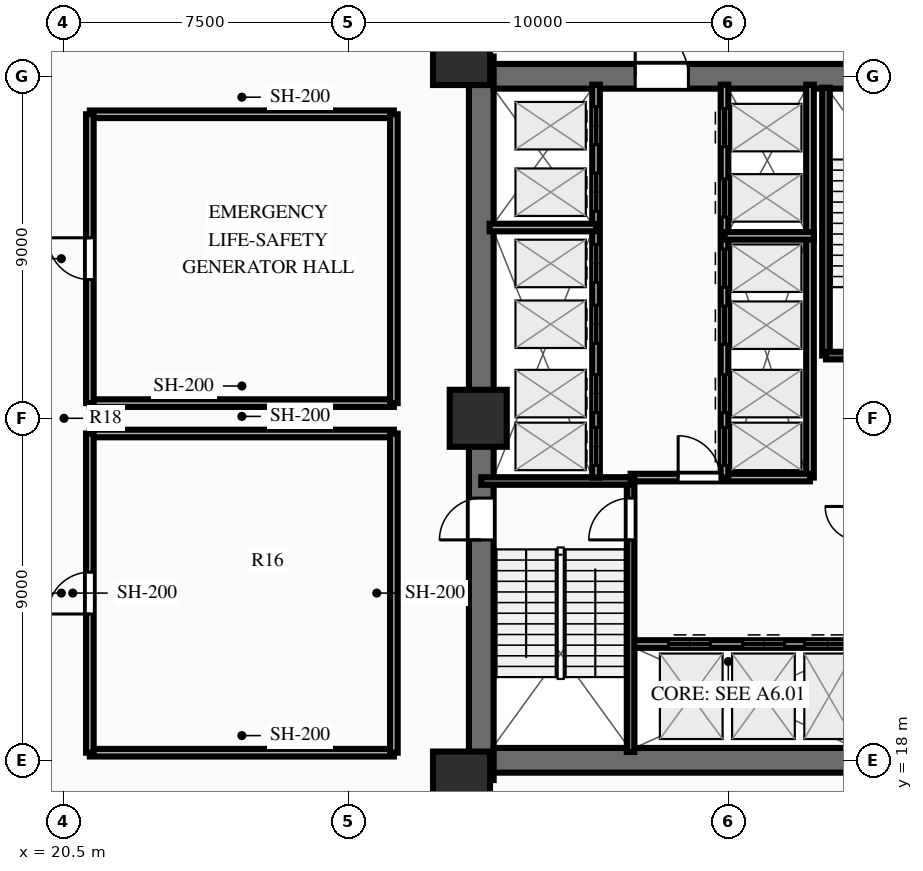
"""IFC4 building model, lengths in metres.
Left out: names, types, materials, properties, quantities, classifications, styles, units other than length and angle.
Written with IfcOpenShell. Run it as: python <this file> out.ifc"""

import sys

from ifc_helpers import new_model, si_unit, direction, frame, frame_2d, origin, origin_2d, place, context, subcontext, project, spatial, rectangle, extrude, source, transform, mapped, element, fill, save


model = new_model("IFC4")
c1 = context("Model", 3, precision=1e-05, world=origin(), true_north=direction((0.0, 1.0)))
c2 = subcontext(c1, "Body", "Model", "MODEL_VIEW")
j1 = project(units=[si_unit("LENGTHUNIT", "METRE"), si_unit("PLANEANGLEUNIT", "RADIAN")], contexts=[c1])
p1 = place(None, origin())
s1 = spatial("IfcSite", under=j1, at=p1, CompositionType="ELEMENT")
p2 = place(p1, origin())
s2 = spatial("IfcBuilding", under=s1, at=p2, CompositionType="ELEMENT")
p3 = place(p2, frame((0.0, 0.0, -4.6)))
s3 = spatial("IfcBuildingStorey", under=s2, at=p3, CompositionType="ELEMENT", Elevation=-4.6)
p4 = place(p3, frame((31.5, 17.48, 0.0), z_axis=(0.0, 0.0, 1.0), x_axis=(0.0, 1.0, 0.0)))
e1 = element("IfcWall", 1, at=p4, inside=s3, PredefinedType="SHEAR", context=c2, shape_type="SweptSolid", body=[
    extrude(rectangle(XDim=19.04, YDim=0.65, at=frame_2d((9.52, 0.0))), origin(), (0.0, 0.0, 1.0), 4.6),
])
p5 = place(p4, frame((6.32, 0.0, 0.0)))
e2 = element("IfcOpeningElement", 2, at=p5, cuts=e1, PredefinedType="OPENING", context=c2, shape_type="SweptSolid", body=[
    extrude(rectangle(XDim=1.1, YDim=2.15, at=frame_2d((0.55, 1.075))), frame((0.0, 0.337, 0.0), z_axis=(0.0, -1.0, 0.0), x_axis=(1.0, 0.0, 0.0)), (0.0, 0.0, 1.0), 0.674),
])
p6 = place(p3, frame((31.825, 18.0, 0.0), z_axis=(0.0, 0.0, 1.0), x_axis=(1.0, 0.0, 0.0)))
e3 = element("IfcWall", 3, at=p6, inside=s3, PredefinedType="SHEAR", context=c2, shape_type="SweptSolid", body=[
    extrude(rectangle(XDim=12.35, YDim=0.65, at=frame_2d((6.175, 0.0))), origin(), (0.0, 0.0, 1.0), 4.6),
])
p7 = place(p3, frame((31.825, 36.0, 0.0), z_axis=(0.0, 0.0, 1.0), x_axis=(1.0, 0.0, 0.0)))
e4 = element("IfcWall", 4, at=p7, inside=s3, PredefinedType="SHEAR", context=c2, shape_type="SweptSolid", body=[
    extrude(rectangle(XDim=12.35, YDim=0.65, at=frame_2d((6.175, 0.0))), origin(), (0.0, 0.0, 1.0), 4.6),
])
p8 = place(p7, frame((5.125, 0.0, 0.0), z_axis=(0.0, 0.0, 1.0), x_axis=(-1.0, 0.0, 0.0)))
e5 = element("IfcOpeningElement", 5, at=p8, cuts=e4, PredefinedType="OPENING", context=c2, shape_type="SweptSolid", body=[
    extrude(rectangle(XDim=1.4, YDim=2.15, at=frame_2d((0.7, 1.075))), frame((0.0, 0.337, 0.0), z_axis=(0.0, -1.0, 0.0), x_axis=(1.0, 0.0, 0.0)), (0.0, 0.0, 1.0), 0.674),
])
m1 = source(origin(), c2, "Body", "SweptSolid", [
    extrude(rectangle(XDim=1.5, YDim=1.5, at=origin_2d()), origin(), (0.0, 0.0, 1.0), 4.6),
])
for number, where, z_axis, x_axis in (
    (6, (30.98, 17.48, 0.0), (0.0, 0.0, 1.0), (1.0, 0.0, 0.0)),
    (7, (30.98, 36.52, 0.0), (0.0, 0.0, 1.0), (1.0, 0.0, 0.0)),
    (8, (31.42, 27.0, 0.0), (0.0, 0.0, 1.0), (1.0, 0.0, 0.0)),
):
    element("IfcColumn", number, at=place(p3, frame(where, z_axis=z_axis, x_axis=x_axis)), inside=s3, PredefinedType="COLUMN", context=c2, shape_type="MappedRepresentation", body=[
        mapped(m1, transform((0.0, 0.0, 0.0), scale=1.0)),
    ])
p9 = place(p3, frame((40.15, 25.44, 0.0), z_axis=(0.0, 0.0, 1.0), x_axis=(0.0, 1.0, 0.0)))
e9 = element("IfcWall", 9, at=p9, inside=s3, PredefinedType="PARTITIONING", context=c2, shape_type="SweptSolid", body=[
    extrude(rectangle(XDim=6.36, YDim=0.2, at=frame_2d((3.18, 0.0))), origin(), (0.0, 0.0, 1.0), 4.32),
])
p10 = place(p3, frame((40.15, 31.8, 0.0), z_axis=(0.0, 0.0, 1.0), x_axis=(0.0, 1.0, 0.0)))
e10 = element("IfcWall", 10, at=p10, inside=s3, PredefinedType="PARTITIONING", context=c2, shape_type="SweptSolid", body=[
    extrude(rectangle(XDim=3.98, YDim=0.2, at=frame_2d((1.99, 0.0))), origin(), (0.0, 0.0, 1.0), 4.32),
])
p11 = place(p3, frame((35.43, 21.06, 0.0), z_axis=(0.0, 0.0, 1.0), x_axis=(1.0, 0.0, 0.0)))
e11 = element("IfcWall", 11, at=p11, inside=s3, PredefinedType="PARTITIONING", context=c2, shape_type="SweptSolid", body=[
    extrude(rectangle(XDim=6.02, YDim=0.2, at=frame_2d((3.01, 0.0))), origin(), (0.0, 0.0, 1.0), 4.32),
])
p12 = place(p11, frame((1.0, 0.0, 0.0)))
e12 = element("IfcOpeningElement", 12, at=p12, cuts=e11, PredefinedType="OPENING", context=c2, shape_type="SweptSolid", body=[
    extrude(rectangle(XDim=1.1, YDim=2.15, at=frame_2d((0.55, 1.075))), frame((0.0, 0.112, 0.0), z_axis=(0.0, -1.0, 0.0), x_axis=(1.0, 0.0, 0.0)), (0.0, 0.0, 1.0), 0.224),
])
p13 = place(p11, frame((2.95, 0.0, 0.0)))
e13 = element("IfcOpeningElement", 13, at=p13, cuts=e11, PredefinedType="OPENING", context=c2, shape_type="SweptSolid", body=[
    extrude(rectangle(XDim=1.1, YDim=2.15, at=frame_2d((0.55, 1.075))), frame((0.0, 0.112, 0.0), z_axis=(0.0, -1.0, 0.0), x_axis=(1.0, 0.0, 0.0)), (0.0, 0.0, 1.0), 0.224),
])
p14 = place(p11, frame((4.58, 0.0, 0.0)))
e14 = element("IfcOpeningElement", 14, at=p14, cuts=e11, PredefinedType="OPENING", context=c2, shape_type="SweptSolid", body=[
    extrude(rectangle(XDim=1.2, YDim=2.15, at=frame_2d((0.6, 1.075))), frame((0.0, 0.112, 0.0), z_axis=(0.0, -1.0, 0.0), x_axis=(1.0, 0.0, 0.0)), (0.0, 0.0, 1.0), 0.224),
])
p15 = place(p3, frame((35.43, 25.44, 0.0), z_axis=(0.0, 0.0, 1.0), x_axis=(1.0, 0.0, 0.0)))
e15 = element("IfcWall", 15, at=p15, inside=s3, PredefinedType="PARTITIONING", context=c2, shape_type="SweptSolid", body=[
    extrude(rectangle(XDim=4.72, YDim=0.2, at=frame_2d((2.36, 0.0))), origin(), (0.0, 0.0, 1.0), 4.32),
])
p16 = place(p15, frame((1.25, 0.0, 0.0)))
e16 = element("IfcOpeningElement", 16, at=p16, cuts=e15, PredefinedType="OPENING", context=c2, shape_type="SweptSolid", body=[
    extrude(rectangle(XDim=1.1, YDim=2.15, at=frame_2d((0.55, 1.075))), frame((0.0, 0.112, 0.0), z_axis=(0.0, -1.0, 0.0), x_axis=(1.0, 0.0, 0.0)), (0.0, 0.0, 1.0), 0.224),
])
p17 = place(p3, frame((35.43, 18.22, 0.0), z_axis=(0.0, 0.0, 1.0), x_axis=(0.0, 1.0, 0.0)))
e17 = element("IfcWall", 17, at=p17, inside=s3, PredefinedType="SOLIDWALL", context=c2, shape_type="SweptSolid", body=[
    extrude(rectangle(XDim=7.22, YDim=0.2, at=frame_2d((3.61, 0.0))), origin(), (0.0, 0.0, 1.0), 4.32),
])
p18 = place(p17, frame((6.68, 0.0, 0.0), z_axis=(0.0, 0.0, 1.0), x_axis=(-1.0, 0.0, 0.0)))
e18 = element("IfcOpeningElement", 18, at=p18, cuts=e17, PredefinedType="OPENING", context=c2, shape_type="SweptSolid", body=[
    extrude(rectangle(XDim=1.1, YDim=2.15, at=frame_2d((0.55, 1.075))), frame((0.0, 0.112, 0.0), z_axis=(0.0, -1.0, 0.0), x_axis=(1.0, 0.0, 0.0)), (0.0, 0.0, 1.0), 0.224),
])
p19 = place(p3, frame((31.5, 25.35, 0.0), z_axis=(0.0, 0.0, 1.0), x_axis=(1.0, 0.0, 0.0)))
e19 = element("IfcWall", 19, at=p19, inside=s3, PredefinedType="SOLIDWALL", context=c2, shape_type="SweptSolid", body=[
    extrude(rectangle(XDim=3.93, YDim=0.2, at=frame_2d((1.965, 0.0))), origin(), (0.0, 0.0, 1.0), 4.32),
])
p20 = place(p3, frame((40.57, 28.65, 0.0), z_axis=(0.0, 0.0, 1.0), x_axis=(0.0, 1.0, 0.0)))
e20 = element("IfcWall", 20, at=p20, inside=s3, PredefinedType="SOLIDWALL", context=c2, shape_type="SweptSolid", body=[
    extrude(rectangle(XDim=7.05, YDim=0.2, at=frame_2d((3.525, 0.0))), origin(), (0.0, 0.0, 1.0), 4.32),
])
p21 = place(p3, frame((40.57, 28.65, 0.0), z_axis=(0.0, 0.0, 1.0), x_axis=(1.0, 0.0, 0.0)))
e21 = element("IfcWall", 21, at=p21, inside=s3, PredefinedType="SOLIDWALL", context=c2, shape_type="SweptSolid", body=[
    extrude(rectangle(XDim=3.93, YDim=0.2, at=frame_2d((1.965, 0.0))), origin(), (0.0, 0.0, 1.0), 4.32),
])
p22 = place(p3, frame((34.52, 25.44, 0.0), z_axis=(0.0, 0.0, 1.0), x_axis=(0.0, 1.0, 0.0)))
e22 = element("IfcWall", 22, at=p22, inside=s3, PredefinedType="PARTITIONING", context=c2, shape_type="SweptSolid", body=[
    extrude(rectangle(XDim=10.34, YDim=0.2, at=frame_2d((5.17, 0.0))), origin(), (0.0, 0.0, 1.0), 4.32),
])
p23 = place(p22, frame((0.32, 0.0, 0.0)))
e23 = element("IfcOpeningElement", 23, at=p23, cuts=e22, PredefinedType="OPENING", context=c2, shape_type="SweptSolid", body=[
    extrude(rectangle(XDim=1.0, YDim=2.15, at=frame_2d((0.5, 1.075))), frame((0.0, 0.112, 0.0), z_axis=(0.0, -1.0, 0.0), x_axis=(1.0, 0.0, 0.0)), (0.0, 0.0, 1.0), 0.224),
])
p24 = place(p22, frame((1.71, 0.0, 0.0)))
e24 = element("IfcOpeningElement", 24, at=p24, cuts=e22, PredefinedType="OPENING", context=c2, shape_type="SweptSolid", body=[
    extrude(rectangle(XDim=1.0, YDim=2.15, at=frame_2d((0.5, 1.075))), frame((0.0, 0.112, 0.0), z_axis=(0.0, -1.0, 0.0), x_axis=(1.0, 0.0, 0.0)), (0.0, 0.0, 1.0), 0.224),
])
p25 = place(p22, frame((3.535, 0.0, 0.0)))
e25 = element("IfcOpeningElement", 25, at=p25, cuts=e22, PredefinedType="OPENING", context=c2, shape_type="SweptSolid", body=[
    extrude(rectangle(XDim=1.0, YDim=2.15, at=frame_2d((0.5, 1.075))), frame((0.0, 0.112, 0.0), z_axis=(0.0, -1.0, 0.0), x_axis=(1.0, 0.0, 0.0)), (0.0, 0.0, 1.0), 0.224),
])
p26 = place(p22, frame((5.135, 0.0, 0.0)))
e26 = element("IfcOpeningElement", 26, at=p26, cuts=e22, PredefinedType="OPENING", context=c2, shape_type="SweptSolid", body=[
    extrude(rectangle(XDim=1.0, YDim=2.15, at=frame_2d((0.5, 1.075))), frame((0.0, 0.112, 0.0), z_axis=(0.0, -1.0, 0.0), x_axis=(1.0, 0.0, 0.0)), (0.0, 0.0, 1.0), 0.224),
])
p27 = place(p22, frame((7.01, 0.0, 0.0)))
e27 = element("IfcOpeningElement", 27, at=p27, cuts=e22, PredefinedType="OPENING", context=c2, shape_type="SweptSolid", body=[
    extrude(rectangle(XDim=1.0, YDim=2.15, at=frame_2d((0.5, 1.075))), frame((0.0, 0.112, 0.0), z_axis=(0.0, -1.0, 0.0), x_axis=(1.0, 0.0, 0.0)), (0.0, 0.0, 1.0), 0.224),
])
p28 = place(p22, frame((8.76, 0.0, 0.0)))
e28 = element("IfcOpeningElement", 28, at=p28, cuts=e22, PredefinedType="OPENING", context=c2, shape_type="SweptSolid", body=[
    extrude(rectangle(XDim=1.0, YDim=2.15, at=frame_2d((0.5, 1.075))), frame((0.0, 0.112, 0.0), z_axis=(0.0, -1.0, 0.0), x_axis=(1.0, 0.0, 0.0)), (0.0, 0.0, 1.0), 0.224),
])
p29 = place(p3, frame((31.72, 32.02, 0.0), z_axis=(0.0, 0.0, 1.0), x_axis=(1.0, 0.0, 0.0)))
e29 = element("IfcWall", 29, at=p29, inside=s3, PredefinedType="PARTITIONING", context=c2, shape_type="SweptSolid", body=[
    extrude(rectangle(XDim=2.8, YDim=0.2, at=frame_2d((1.4, 0.0))), origin(), (0.0, 0.0, 1.0), 4.32),
])
p30 = place(p3, frame((37.9, 25.44, 0.0), z_axis=(0.0, 0.0, 1.0), x_axis=(0.0, 1.0, 0.0)))
e30 = element("IfcWall", 30, at=p30, inside=s3, PredefinedType="PARTITIONING", context=c2, shape_type="SweptSolid", body=[
    extrude(rectangle(XDim=10.34, YDim=0.2, at=frame_2d((5.17, 0.0))), origin(), (0.0, 0.0, 1.0), 4.32),
])
p31 = place(p30, frame((0.32, 0.0, 0.0)))
e31 = element("IfcOpeningElement", 31, at=p31, cuts=e30, PredefinedType="OPENING", context=c2, shape_type="SweptSolid", body=[
    extrude(rectangle(XDim=1.0, YDim=2.15, at=frame_2d((0.5, 1.075))), frame((0.0, 0.112, 0.0), z_axis=(0.0, -1.0, 0.0), x_axis=(1.0, 0.0, 0.0)), (0.0, 0.0, 1.0), 0.224),
])
p32 = place(p30, frame((1.71, 0.0, 0.0)))
e32 = element("IfcOpeningElement", 32, at=p32, cuts=e30, PredefinedType="OPENING", context=c2, shape_type="SweptSolid", body=[
    extrude(rectangle(XDim=1.0, YDim=2.15, at=frame_2d((0.5, 1.075))), frame((0.0, 0.112, 0.0), z_axis=(0.0, -1.0, 0.0), x_axis=(1.0, 0.0, 0.0)), (0.0, 0.0, 1.0), 0.224),
])
p33 = place(p30, frame((3.51, 0.0, 0.0)))
e33 = element("IfcOpeningElement", 33, at=p33, cuts=e30, PredefinedType="OPENING", context=c2, shape_type="SweptSolid", body=[
    extrude(rectangle(XDim=1.0, YDim=2.15, at=frame_2d((0.5, 1.075))), frame((0.0, 0.112, 0.0), z_axis=(0.0, -1.0, 0.0), x_axis=(1.0, 0.0, 0.0)), (0.0, 0.0, 1.0), 0.224),
])
p34 = place(p30, frame((5.01, 0.0, 0.0)))
e34 = element("IfcOpeningElement", 34, at=p34, cuts=e30, PredefinedType="OPENING", context=c2, shape_type="SweptSolid", body=[
    extrude(rectangle(XDim=1.0, YDim=2.15, at=frame_2d((0.5, 1.075))), frame((0.0, 0.112, 0.0), z_axis=(0.0, -1.0, 0.0), x_axis=(1.0, 0.0, 0.0)), (0.0, 0.0, 1.0), 0.224),
])
p35 = place(p30, frame((6.86, 0.0, 0.0)))
e35 = element("IfcOpeningElement", 35, at=p35, cuts=e30, PredefinedType="OPENING", context=c2, shape_type="SweptSolid", body=[
    extrude(rectangle(XDim=1.0, YDim=2.15, at=frame_2d((0.5, 1.075))), frame((0.0, 0.112, 0.0), z_axis=(0.0, -1.0, 0.0), x_axis=(1.0, 0.0, 0.0)), (0.0, 0.0, 1.0), 0.224),
])
p36 = place(p30, frame((8.71, 0.0, 0.0)))
e36 = element("IfcOpeningElement", 36, at=p36, cuts=e30, PredefinedType="OPENING", context=c2, shape_type="SweptSolid", body=[
    extrude(rectangle(XDim=1.0, YDim=2.15, at=frame_2d((0.5, 1.075))), frame((0.0, 0.112, 0.0), z_axis=(0.0, -1.0, 0.0), x_axis=(1.0, 0.0, 0.0)), (0.0, 0.0, 1.0), 0.224),
])
p37 = place(p3, frame((37.9, 31.8, 0.0), z_axis=(0.0, 0.0, 1.0), x_axis=(1.0, 0.0, 0.0)))
e37 = element("IfcWall", 37, at=p37, inside=s3, PredefinedType="PARTITIONING", context=c2, shape_type="SweptSolid", body=[
    extrude(rectangle(XDim=2.35, YDim=0.2, at=frame_2d((1.175, 0.0))), origin(), (0.0, 0.0, 1.0), 4.32),
])
for number, where, z_axis, x_axis in (
    (38, (21.2, 18.2, 0.0), (0.0, 0.0, 1.0), (1.0, 0.0, 0.0)),
    (39, (21.2, 26.6, 0.0), (0.0, 0.0, 1.0), (1.0, 0.0, 0.0)),
):
    element("IfcWall", number, at=place(p3, frame(where, z_axis=z_axis, x_axis=x_axis)), inside=s3, PredefinedType="PARTITIONING", context=c2, shape_type="SweptSolid", body=[
        extrude(rectangle(XDim=8.0, YDim=0.2, at=frame_2d((4.0, 0.0))), origin(), (0.0, 0.0, 1.0), 4.32),
    ])
p38 = place(p3, frame((21.2, 18.2, 0.0), z_axis=(0.0, 0.0, 1.0), x_axis=(0.0, 1.0, 0.0)))
e40 = element("IfcWall", 40, at=p38, inside=s3, PredefinedType="PARTITIONING", context=c2, shape_type="SweptSolid", body=[
    extrude(rectangle(XDim=8.4, YDim=0.2, at=frame_2d((4.2, 0.0))), origin(), (0.0, 0.0, 1.0), 4.32),
])
p39 = place(p38, frame((3.65, 0.0, 0.0)))
e41 = element("IfcOpeningElement", 41, at=p39, cuts=e40, PredefinedType="OPENING", context=c2, shape_type="SweptSolid", body=[
    extrude(rectangle(XDim=1.1, YDim=2.15, at=frame_2d((0.55, 1.075))), frame((0.0, 0.112, 0.0), z_axis=(0.0, -1.0, 0.0), x_axis=(1.0, 0.0, 0.0)), (0.0, 0.0, 1.0), 0.224),
])
p40 = place(p3, frame((29.2, 18.2, 0.0), z_axis=(0.0, 0.0, 1.0), x_axis=(0.0, 1.0, 0.0)))
e42 = element("IfcWall", 42, at=p40, inside=s3, PredefinedType="PARTITIONING", context=c2, shape_type="SweptSolid", body=[
    extrude(rectangle(XDim=8.4, YDim=0.2, at=frame_2d((4.2, 0.0))), origin(), (0.0, 0.0, 1.0), 4.32),
])
for number, where, z_axis, x_axis in (
    (43, (21.2, 27.4, 0.0), (0.0, 0.0, 1.0), (1.0, 0.0, 0.0)),
    (44, (21.2, 35.0, 0.0), (0.0, 0.0, 1.0), (1.0, 0.0, 0.0)),
):
    element("IfcWall", number, at=place(p3, frame(where, z_axis=z_axis, x_axis=x_axis)), inside=s3, PredefinedType="PARTITIONING", context=c2, shape_type="SweptSolid", body=[
        extrude(rectangle(XDim=8.0, YDim=0.2, at=frame_2d((4.0, 0.0))), origin(), (0.0, 0.0, 1.0), 4.32),
    ])
p41 = place(p3, frame((21.2, 27.4, 0.0), z_axis=(0.0, 0.0, 1.0), x_axis=(0.0, 1.0, 0.0)))
e45 = element("IfcWall", 45, at=p41, inside=s3, PredefinedType="PARTITIONING", context=c2, shape_type="SweptSolid", body=[
    extrude(rectangle(XDim=7.6, YDim=0.2, at=frame_2d((3.8, 0.0))), origin(), (0.0, 0.0, 1.0), 4.32),
])
p42 = place(p41, frame((3.25, 0.0, 0.0)))
e46 = element("IfcOpeningElement", 46, at=p42, cuts=e45, PredefinedType="OPENING", context=c2, shape_type="SweptSolid", body=[
    extrude(rectangle(XDim=1.1, YDim=2.15, at=frame_2d((0.55, 1.075))), frame((0.0, 0.112, 0.0), z_axis=(0.0, -1.0, 0.0), x_axis=(1.0, 0.0, 0.0)), (0.0, 0.0, 1.0), 0.224),
])
p43 = place(p3, frame((29.2, 27.4, 0.0), z_axis=(0.0, 0.0, 1.0), x_axis=(0.0, 1.0, 0.0)))
e47 = element("IfcWall", 47, at=p43, inside=s3, PredefinedType="PARTITIONING", context=c2, shape_type="SweptSolid", body=[
    extrude(rectangle(XDim=7.6, YDim=0.2, at=frame_2d((3.8, 0.0))), origin(), (0.0, 0.0, 1.0), 4.32),
])
m2 = source(origin(), c2, "Body", "SweptSolid", [
    extrude(rectangle(XDim=1.1, YDim=2.15, at=frame_2d((0.55, 1.075))), frame((0.0, 0.025, 0.0), z_axis=(0.0, -1.0, 0.0), x_axis=(1.0, 0.0, 0.0)), (0.0, 0.0, 1.0), 0.05),
])
p44 = place(p5, origin())
e48 = element("IfcDoor", 48, at=p44, inside=s3, OperationType="SINGLE_SWING_LEFT", PredefinedType="DOOR", context=c2, shape_type="MappedRepresentation", body=[
    mapped(m2, transform((0.0, 0.0, 0.0), scale=1.0)),
])
fill(e2, e48)
m3 = source(origin(), c2, "Body", "SweptSolid", [
    extrude(rectangle(XDim=1.4, YDim=2.15, at=frame_2d((0.7, 1.075))), frame((0.0, 0.025, 0.0), z_axis=(0.0, -1.0, 0.0), x_axis=(1.0, 0.0, 0.0)), (0.0, 0.0, 1.0), 0.05),
])
p45 = place(p8, origin())
e49 = element("IfcDoor", 49, at=p45, inside=s3, OperationType="SINGLE_SWING_RIGHT", PredefinedType="DOOR", context=c2, shape_type="MappedRepresentation", body=[
    mapped(m3, transform((0.0, 0.0, 0.0), scale=1.0)),
])
fill(e5, e49)
p46 = place(p12, origin())
e50 = element("IfcDoor", 50, at=p46, inside=s3, OperationType="DOUBLE_DOOR_SLIDING", PredefinedType="DOOR", context=c2, shape_type="MappedRepresentation", body=[
    mapped(m2, transform((0.0, 0.0, 0.0), scale=1.0)),
])
fill(e12, e50)
p47 = place(p13, origin())
e51 = element("IfcDoor", 51, at=p47, inside=s3, OperationType="DOUBLE_DOOR_SLIDING", PredefinedType="DOOR", context=c2, shape_type="MappedRepresentation", body=[
    mapped(m2, transform((0.0, 0.0, 0.0), scale=1.0)),
])
fill(e13, e51)
m4 = source(origin(), c2, "Body", "SweptSolid", [
    extrude(rectangle(XDim=1.2, YDim=2.15, at=frame_2d((0.6, 1.075))), frame((0.0, 0.025, 0.0), z_axis=(0.0, -1.0, 0.0), x_axis=(1.0, 0.0, 0.0)), (0.0, 0.0, 1.0), 0.05),
])
p48 = place(p14, origin())
e52 = element("IfcDoor", 52, at=p48, inside=s3, OperationType="DOUBLE_DOOR_SLIDING", PredefinedType="DOOR", context=c2, shape_type="MappedRepresentation", body=[
    mapped(m4, transform((0.0, 0.0, 0.0), scale=1.0)),
])
fill(e14, e52)
p49 = place(p16, origin())
e53 = element("IfcDoor", 53, at=p49, inside=s3, OperationType="SINGLE_SWING_LEFT", PredefinedType="DOOR", context=c2, shape_type="MappedRepresentation", body=[
    mapped(m2, transform((0.0, 0.0, 0.0), scale=1.0)),
])
fill(e16, e53)
p50 = place(p18, origin())
e54 = element("IfcDoor", 54, at=p50, inside=s3, OperationType="SINGLE_SWING_RIGHT", PredefinedType="DOOR", context=c2, shape_type="MappedRepresentation", body=[
    mapped(m2, transform((0.0, 0.0, 0.0), scale=1.0)),
])
fill(e18, e54)
m5 = source(origin(), c2, "Body", "SweptSolid", [
    extrude(rectangle(XDim=1.0, YDim=2.15, at=frame_2d((0.5, 1.075))), frame((0.0, 0.025, 0.0), z_axis=(0.0, -1.0, 0.0), x_axis=(1.0, 0.0, 0.0)), (0.0, 0.0, 1.0), 0.05),
])
p51 = place(p23, origin())
e55 = element("IfcDoor", 55, at=p51, inside=s3, OperationType="DOUBLE_DOOR_SLIDING", PredefinedType="DOOR", context=c2, shape_type="MappedRepresentation", body=[
    mapped(m5, transform((0.0, 0.0, 0.0), scale=1.0)),
])
fill(e23, e55)
p52 = place(p24, origin())
e56 = element("IfcDoor", 56, at=p52, inside=s3, OperationType="DOUBLE_DOOR_SLIDING", PredefinedType="DOOR", context=c2, shape_type="MappedRepresentation", body=[
    mapped(m5, transform((0.0, 0.0, 0.0), scale=1.0)),
])
fill(e24, e56)
p53 = place(p25, origin())
e57 = element("IfcDoor", 57, at=p53, inside=s3, OperationType="DOUBLE_DOOR_SLIDING", PredefinedType="DOOR", context=c2, shape_type="MappedRepresentation", body=[
    mapped(m5, transform((0.0, 0.0, 0.0), scale=1.0)),
])
fill(e25, e57)
p54 = place(p26, origin())
e58 = element("IfcDoor", 58, at=p54, inside=s3, OperationType="DOUBLE_DOOR_SLIDING", PredefinedType="DOOR", context=c2, shape_type="MappedRepresentation", body=[
    mapped(m5, transform((0.0, 0.0, 0.0), scale=1.0)),
])
fill(e26, e58)
p55 = place(p27, origin())
e59 = element("IfcDoor", 59, at=p55, inside=s3, OperationType="DOUBLE_DOOR_SLIDING", PredefinedType="DOOR", context=c2, shape_type="MappedRepresentation", body=[
    mapped(m5, transform((0.0, 0.0, 0.0), scale=1.0)),
])
fill(e27, e59)
p56 = place(p28, origin())
e60 = element("IfcDoor", 60, at=p56, inside=s3, OperationType="DOUBLE_DOOR_SLIDING", PredefinedType="DOOR", context=c2, shape_type="MappedRepresentation", body=[
    mapped(m5, transform((0.0, 0.0, 0.0), scale=1.0)),
])
fill(e28, e60)
p57 = place(p31, origin())
e61 = element("IfcDoor", 61, at=p57, inside=s3, OperationType="DOUBLE_DOOR_SLIDING", PredefinedType="DOOR", context=c2, shape_type="MappedRepresentation", body=[
    mapped(m5, transform((0.0, 0.0, 0.0), scale=1.0)),
])
fill(e31, e61)
p58 = place(p32, origin())
e62 = element("IfcDoor", 62, at=p58, inside=s3, OperationType="DOUBLE_DOOR_SLIDING", PredefinedType="DOOR", context=c2, shape_type="MappedRepresentation", body=[
    mapped(m5, transform((0.0, 0.0, 0.0), scale=1.0)),
])
fill(e32, e62)
p59 = place(p33, origin())
e63 = element("IfcDoor", 63, at=p59, inside=s3, OperationType="DOUBLE_DOOR_SLIDING", PredefinedType="DOOR", context=c2, shape_type="MappedRepresentation", body=[
    mapped(m5, transform((0.0, 0.0, 0.0), scale=1.0)),
])
fill(e33, e63)
p60 = place(p34, origin())
e64 = element("IfcDoor", 64, at=p60, inside=s3, OperationType="DOUBLE_DOOR_SLIDING", PredefinedType="DOOR", context=c2, shape_type="MappedRepresentation", body=[
    mapped(m5, transform((0.0, 0.0, 0.0), scale=1.0)),
])
fill(e34, e64)
p61 = place(p35, origin())
e65 = element("IfcDoor", 65, at=p61, inside=s3, OperationType="DOUBLE_DOOR_SLIDING", PredefinedType="DOOR", context=c2, shape_type="MappedRepresentation", body=[
    mapped(m5, transform((0.0, 0.0, 0.0), scale=1.0)),
])
fill(e35, e65)
p62 = place(p36, origin())
e66 = element("IfcDoor", 66, at=p62, inside=s3, OperationType="DOUBLE_DOOR_SLIDING", PredefinedType="DOOR", context=c2, shape_type="MappedRepresentation", body=[
    mapped(m5, transform((0.0, 0.0, 0.0), scale=1.0)),
])
fill(e36, e66)
p63 = place(p39, origin())
e67 = element("IfcDoor", 67, at=p63, inside=s3, OperationType="SINGLE_SWING_LEFT", PredefinedType="DOOR", context=c2, shape_type="MappedRepresentation", body=[
    mapped(m2, transform((0.0, 0.0, 0.0), scale=1.0)),
])
fill(e41, e67)
p64 = place(p42, origin())
e68 = element("IfcDoor", 68, at=p64, inside=s3, OperationType="SINGLE_SWING_RIGHT", PredefinedType="DOOR", context=c2, shape_type="MappedRepresentation", body=[
    mapped(m2, transform((0.0, 0.0, 0.0), scale=1.0)),
])
fill(e46, e68)
save(model, sys.argv[1])
